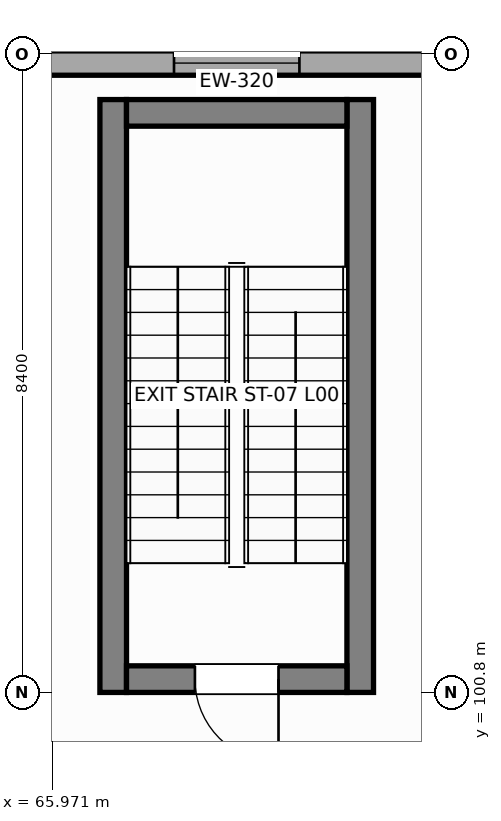
"""IFC4 building model, lengths in metres.
Left out: names, types, materials, properties, quantities, classifications, styles, units other than length and angle.
Written with IfcOpenShell. Run it as: python <this file> out.ifc"""

import sys

from ifc_helpers import new_model, si_unit, direction, frame, frame_2d, origin, place, context, subcontext, project, spatial, rectangle, extrude, element, fill, save


model = new_model("IFC4")
c1 = context("Model", 3, precision=1e-05, world=origin(), true_north=direction((0.0, 1.0)))
c2 = subcontext(c1, "Body", "Model", "MODEL_VIEW")
j1 = project(units=[si_unit("LENGTHUNIT", "METRE"), si_unit("PLANEANGLEUNIT", "RADIAN")], contexts=[c1])
p1 = place(None, origin())
s1 = spatial("IfcSite", under=j1, at=p1, CompositionType="ELEMENT")
p2 = place(p1, origin())
s2 = spatial("IfcBuilding", under=s1, at=p2, CompositionType="ELEMENT")
p3 = place(p2, origin())
s3 = spatial("IfcBuildingStorey", under=s2, at=p3, CompositionType="ELEMENT", Elevation=0.0)
for number, where, z_axis, x_axis in (
    (1, (66.775, 100.8, 0.0), (0.0, 0.0, 1.0), (0.0, 1.0, 0.0)),
    (2, (70.025, 100.8, 0.0), (0.0, 0.0, 1.0), (0.0, 1.0, 0.0)),
):
    element("IfcWall", number, at=place(p3, frame(where, z_axis=z_axis, x_axis=x_axis)), inside=s3, PredefinedType="SHEAR", context=c2, shape_type="SweptSolid", body=[
        extrude(rectangle(XDim=7.8, YDim=0.35, at=frame_2d((3.9, 0.0))), origin(), (0.0, 0.0, 1.0), 4.57),
    ])
p4 = place(p3, frame((66.95, 108.425, 0.0), z_axis=(0.0, 0.0, 1.0), x_axis=(1.0, 0.0, 0.0)))
e3 = element("IfcWall", 3, at=p4, inside=s3, PredefinedType="SHEAR", context=c2, shape_type="SweptSolid", body=[
    extrude(rectangle(XDim=2.9, YDim=0.35, at=frame_2d((1.45, 0.0))), origin(), (0.0, 0.0, 1.0), 4.57),
])
p5 = place(p3, frame((66.95, 100.975, 0.0), z_axis=(0.0, 0.0, 1.0), x_axis=(1.0, 0.0, 0.0)))
e4 = element("IfcWall", 4, at=p5, inside=s3, PredefinedType="SHEAR", context=c2, shape_type="SweptSolid", body=[
    extrude(rectangle(XDim=2.9, YDim=0.35, at=frame_2d((1.45, 0.0))), origin(), (0.0, 0.0, 1.0), 4.57),
])
p6 = place(p5, frame((0.9, 0.0, 0.0)))
e5 = element("IfcOpeningElement", 5, at=p6, cuts=e4, PredefinedType="OPENING", context=c2, shape_type="SweptSolid", body=[
    extrude(rectangle(XDim=1.1, YDim=2.15, at=frame_2d((0.55, 1.075))), frame((0.0, 0.185, 0.0), z_axis=(0.0, -1.0, 0.0), x_axis=(1.0, 0.0, 0.0)), (0.0, 0.0, 1.0), 0.37),
])
p7 = place(p3, frame((64.8, 109.08, 0.0), z_axis=(0.0, 0.0, 1.0), x_axis=(1.0, 0.0, 0.0)))
e6 = element("IfcWall", 6, at=p7, inside=s3, PredefinedType="SOLIDWALL", context=c2, shape_type="SweptSolid", body=[
    extrude(rectangle(XDim=7.2, YDim=0.32, at=frame_2d((3.6, 0.0))), origin(), (0.0, 0.0, 1.0), 4.082),
])
p8 = place(p7, frame((2.775, 0.0, 0.95)))
e7 = element("IfcOpeningElement", 7, at=p8, cuts=e6, PredefinedType="OPENING", context=c2, shape_type="SweptSolid", body=[
    extrude(rectangle(XDim=1.65, YDim=1.75, at=frame_2d((0.825, 0.875))), frame((0.0, 0.17, 0.0), z_axis=(0.0, -1.0, 0.0), x_axis=(1.0, 0.0, 0.0)), (0.0, 0.0, 1.0), 0.34),
])
p9 = place(p6, frame((1.1, 0.0, 0.0), z_axis=(0.0, 0.0, 1.0), x_axis=(-1.0, 0.0, 0.0)))
e8 = element("IfcDoor", 8, at=p9, inside=s3, OperationType="SINGLE_SWING_LEFT", PredefinedType="DOOR", context=c2, shape_type="SweptSolid", body=[
    extrude(rectangle(XDim=1.1, YDim=2.15, at=frame_2d((0.55, 1.075))), frame((0.0, 0.025, 0.0), z_axis=(0.0, -1.0, 0.0), x_axis=(1.0, 0.0, 0.0)), (0.0, 0.0, 1.0), 0.05),
])
fill(e5, e8)
p10 = place(p8, origin())
e9 = element("IfcWindow", 9, at=p10, inside=s3, PartitioningType="SINGLE_PANEL", PredefinedType="WINDOW", context=c2, shape_type="SweptSolid", body=[
    extrude(rectangle(XDim=1.65, YDim=1.75, at=frame_2d((0.825, 0.875))), frame((0.0, 0.03, 0.0), z_axis=(0.0, -1.0, 0.0), x_axis=(1.0, 0.0, 0.0)), (0.0, 0.0, 1.0), 0.06),
])
fill(e7, e9)
save(model, sys.argv[1])
